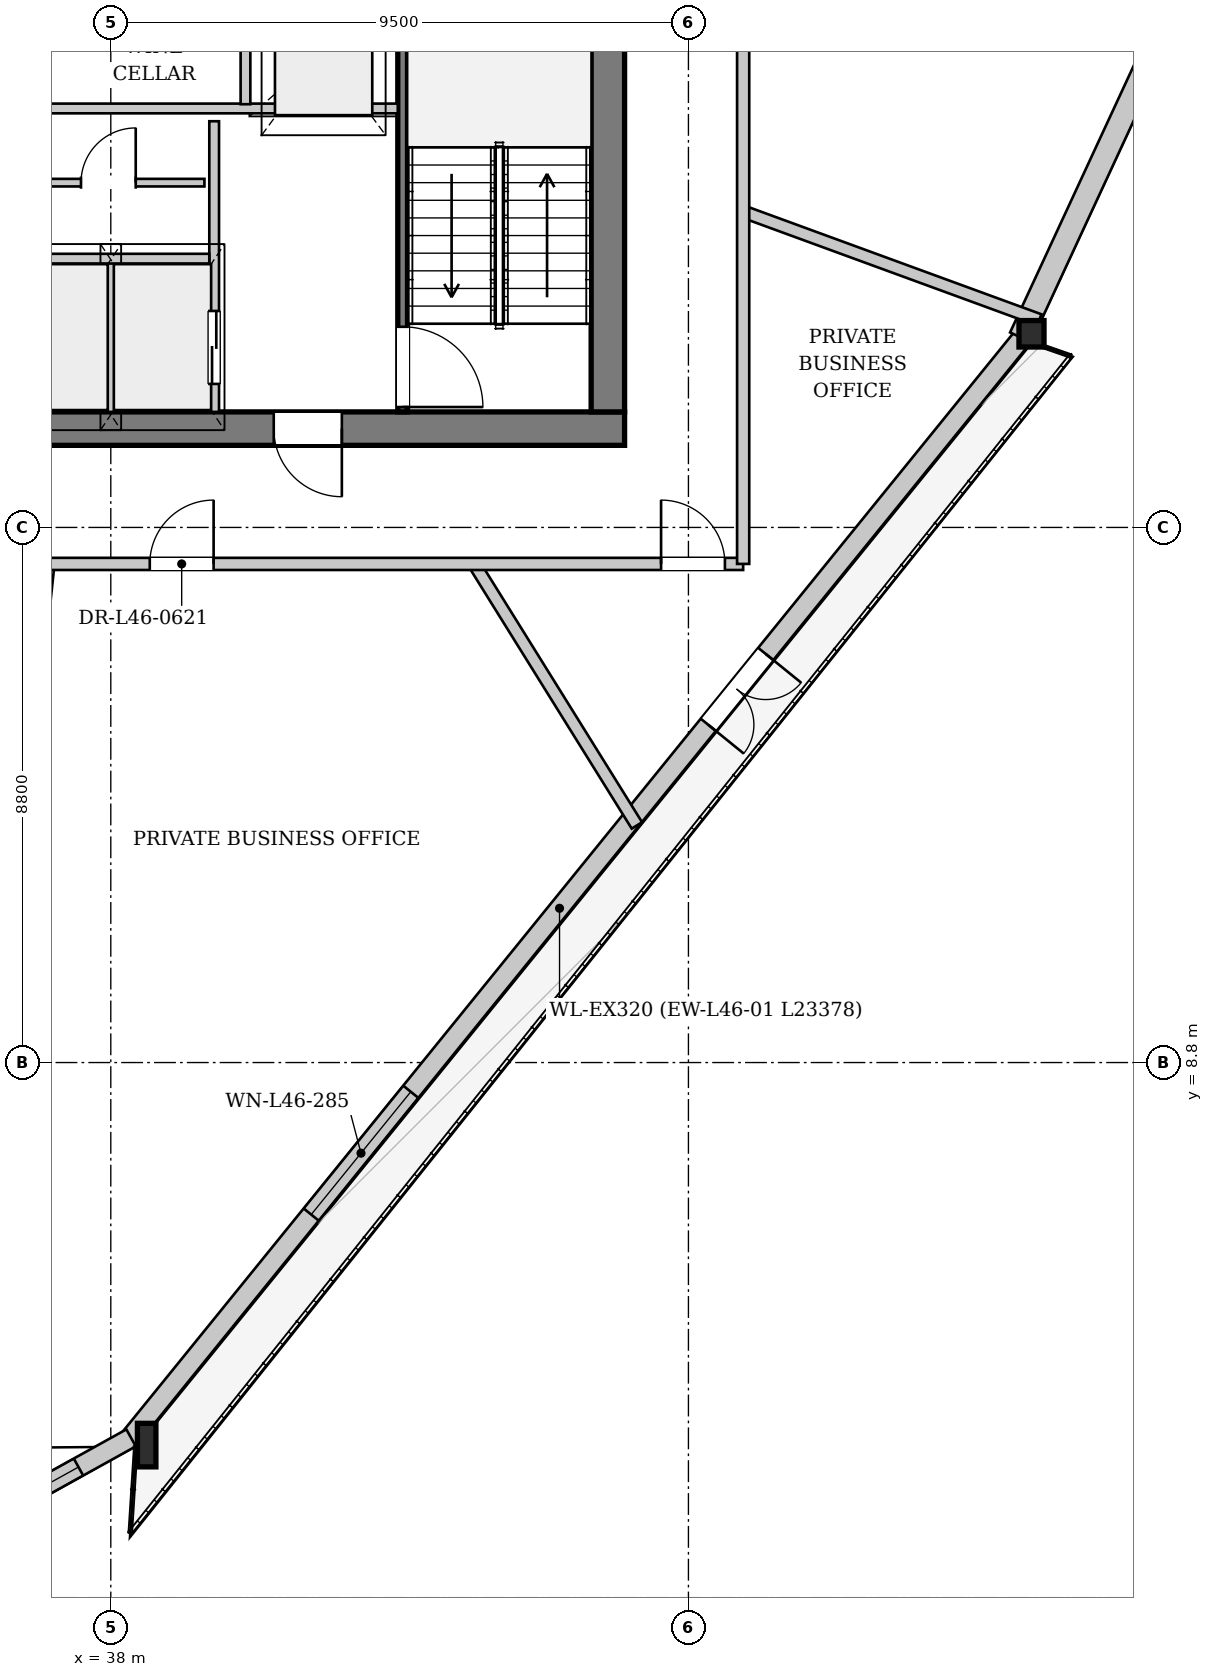
"""IFC4 building model, lengths in metres.
Left out: names, types, materials, properties, quantities, classifications, styles, units other than length and angle.
Written with IfcOpenShell. Run it as: python <this file> out.ifc"""

import sys

from ifc_helpers import new_model, si_unit, direction, frame, frame_2d, origin, origin_2d, place, context, subcontext, project, spatial, rectangle, i_section, extrude, source, transform, mapped, element, fill, save


model = new_model("IFC4")
c1 = context("Model", 3, precision=1e-05, world=origin(), true_north=direction((0.0, 1.0)))
c2 = subcontext(c1, "Body", "Model", "MODEL_VIEW")
j1 = project(units=[si_unit("LENGTHUNIT", "METRE"), si_unit("PLANEANGLEUNIT", "RADIAN")], contexts=[c1])
p1 = place(None, origin())
s1 = spatial("IfcSite", under=j1, at=p1, CompositionType="ELEMENT")
p2 = place(p1, origin())
s2 = spatial("IfcBuilding", under=s1, at=p2, CompositionType="ELEMENT")
p3 = place(p2, frame((0.0, 0.0, 175.0)))
s3 = spatial("IfcBuildingStorey", under=s2, at=p3, CompositionType="ELEMENT", Elevation=175.0)
m1 = source(origin(), c2, "Body", "SweptSolid", [
    extrude(i_section(OverallWidth=0.304, OverallDepth=0.716, WebThickness=0.021, FlangeThickness=0.04, at=origin_2d()), origin(), (0.0, 0.0, 1.0), 3.404),
])
p4 = place(p3, frame((38.411, 2.488, 0.0), z_axis=(0.105068811283, 0.012335723919, 0.994388442617), x_axis=(-0.116605238745, 0.993178341637, 0.0)))
e1 = element("IfcColumn", 1, at=p4, inside=s3, PredefinedType="COLUMN", context=c2, shape_type="MappedRepresentation", body=[
    mapped(m1, transform((0.0, 0.0, 0.0), x_axis=(1.0, 0.0, 0.0), y_axis=(0.0, 1.0, 0.0), z_axis=(0.0, 0.0, 1.0), scale=1.0)),
])
m2 = source(origin(), c2, "Body", "SweptSolid", [
    extrude(i_section(OverallWidth=0.412, OverallDepth=0.435, WebThickness=0.031, FlangeThickness=0.05, at=origin_2d()), origin(), (0.0, 0.0, 1.0), 3.396),
])
p5 = place(p3, frame((53.135, 20.647, 0.0), z_axis=(0.00424121851, 0.081230117231, 0.996686349922), x_axis=(-0.998639713808, 0.052141365588, 0.0)))
e2 = element("IfcColumn", 2, at=p5, inside=s3, PredefinedType="COLUMN", context=c2, shape_type="MappedRepresentation", body=[
    mapped(m2, transform((0.0, 0.0, 0.0), x_axis=(1.0, 0.0, 0.0), y_axis=(0.0, 1.0, 0.0), z_axis=(0.0, 0.0, 1.0), scale=1.0)),
])
p6 = place(p3, frame((53.01, 20.748, 0.0), z_axis=(0.0, 0.0, 1.0), x_axis=(-0.629806386055, -0.776752158725, 0.0)))
e3 = element("IfcWall", 3, at=p6, inside=s3, PredefinedType="SOLIDWALL", context=c2, shape_type="SweptSolid", body=[
    extrude(rectangle(XDim=23.378, YDim=0.32, at=frame_2d((11.689, 0.0))), origin(), (0.0, 0.0, 1.0), 2.722),
])
p7 = place(p6, frame((6.731, 0.0, 0.0)))
e4 = element("IfcOpeningElement", 4, at=p7, cuts=e3, PredefinedType="OPENING", context=c2, shape_type="SweptSolid", body=[
    extrude(rectangle(XDim=1.5, YDim=2.3, at=frame_2d((0.75, 1.15))), frame((0.0, 0.17, 0.0), z_axis=(0.0, -1.0, 0.0), x_axis=(1.0, 0.0, 0.0)), (0.0, 0.0, 1.0), 0.34),
])
p8 = place(p6, frame((16.0, 0.0, 0.252)))
e5 = element("IfcOpeningElement", 5, at=p8, cuts=e3, PredefinedType="OPENING", context=c2, shape_type="SweptSolid", body=[
    extrude(rectangle(XDim=2.6, YDim=2.35, at=frame_2d((1.3, 1.175))), frame((0.0, 0.17, 0.0), z_axis=(0.0, -1.0, 0.0), x_axis=(1.0, 0.0, 0.0)), (0.0, 0.0, 1.0), 0.34),
])
p9 = place(p3, frame((38.333, 2.628, 0.0), z_axis=(0.0, 0.0, 1.0), x_axis=(-0.874431894113, -0.485148289246, 0.0)))
e6 = element("IfcWall", 6, at=p9, inside=s3, PredefinedType="SOLIDWALL", context=c2, shape_type="SweptSolid", body=[
    extrude(rectangle(XDim=3.479, YDim=0.32, at=frame_2d((1.739, 0.0))), origin(), (0.0, 0.0, 1.0), 2.722),
])
p10 = place(p9, frame((0.989, 0.0, 0.302)))
e7 = element("IfcOpeningElement", 7, at=p10, cuts=e6, PredefinedType="OPENING", context=c2, shape_type="SweptSolid", body=[
    extrude(rectangle(XDim=1.5, YDim=2.3, at=frame_2d((0.75, 1.15))), frame((0.0, 0.17, 0.0), z_axis=(0.0, -1.0, 0.0), x_axis=(1.0, 0.0, 0.0)), (0.0, 0.0, 1.0), 0.34),
])
p11 = place(p3, frame((62.792, 41.938, 0.0), z_axis=(0.0, 0.0, 1.0), x_axis=(-0.420482819505, -0.907300500662, 0.0)))
e8 = element("IfcWall", 8, at=p11, inside=s3, PredefinedType="SOLIDWALL", context=c2, shape_type="SweptSolid", body=[
    extrude(rectangle(XDim=23.378, YDim=0.38, at=frame_2d((11.689, 0.0))), origin(), (0.0, 0.0, 1.0), 2.722),
])
p12 = place(p11, frame((5.446, 0.0, 0.352)))
e9 = element("IfcOpeningElement", 9, at=p12, cuts=e8, PredefinedType="OPENING", context=c2, shape_type="SweptSolid", body=[
    extrude(rectangle(XDim=2.2, YDim=2.25, at=frame_2d((1.1, 1.125))), frame((0.0, 0.2, 0.0), z_axis=(0.0, -1.0, 0.0), x_axis=(1.0, 0.0, 0.0)), (0.0, 0.0, 1.0), 0.4),
])
p13 = place(p11, frame((15.732, 0.0, 0.352)))
e10 = element("IfcOpeningElement", 10, at=p13, cuts=e8, PredefinedType="OPENING", context=c2, shape_type="SweptSolid", body=[
    extrude(rectangle(XDim=2.2, YDim=2.25, at=frame_2d((1.1, 1.125))), frame((0.0, 0.2, 0.0), z_axis=(0.0, -1.0, 0.0), x_axis=(1.0, 0.0, 0.0)), (0.0, 0.0, 1.0), 0.4),
])
p14 = place(p3, frame((46.45, 19.225, 0.0), z_axis=(0.0, 0.0, 1.0), x_axis=(-1.0, 0.0, 0.0)))
e11 = element("IfcWall", 11, at=p14, inside=s3, PredefinedType="SHEAR", context=c2, shape_type="SweptSolid", body=[
    extrude(rectangle(XDim=16.9, YDim=0.55, at=frame_2d((8.45, 0.0))), origin(), (0.0, 0.0, 1.0), 3.33),
])
p15 = place(p14, frame((4.65, 0.0, 0.0)))
e12 = element("IfcOpeningElement", 12, at=p15, cuts=e11, PredefinedType="OPENING", context=c2, shape_type="SweptSolid", body=[
    extrude(rectangle(XDim=1.12, YDim=2.25, at=frame_2d((0.56, 1.125))), frame((0.0, 0.285, 0.0), z_axis=(0.0, -1.0, 0.0), x_axis=(1.0, 0.0, 0.0)), (0.0, 0.0, 1.0), 0.57),
])
p16 = place(p14, frame((11.15, 0.0, 0.0)))
e13 = element("IfcOpeningElement", 13, at=p16, cuts=e11, PredefinedType="OPENING", context=c2, shape_type="SweptSolid", body=[
    extrude(rectangle(XDim=1.12, YDim=2.25, at=frame_2d((0.56, 1.125))), frame((0.0, 0.285, 0.0), z_axis=(0.0, -1.0, 0.0), x_axis=(1.0, 0.0, 0.0)), (0.0, 0.0, 1.0), 0.57),
])
p17 = place(p3, frame((46.175, 33.7, 0.0), z_axis=(0.0, 0.0, 1.0), x_axis=(0.0, -1.0, 0.0)))
e14 = element("IfcWall", 14, at=p17, inside=s3, PredefinedType="SHEAR", context=c2, shape_type="SweptSolid", body=[
    extrude(rectangle(XDim=14.2, YDim=0.55, at=frame_2d((7.1, 0.0))), origin(), (0.0, 0.0, 1.0), 3.33),
])
p18 = place(p17, frame((5.18, 0.0, 0.0)))
e15 = element("IfcOpeningElement", 15, at=p18, cuts=e14, PredefinedType="OPENING", context=c2, shape_type="SweptSolid", body=[
    extrude(rectangle(XDim=1.6, YDim=2.2, at=frame_2d((0.8, 1.1))), frame((0.0, 0.285, 0.0), z_axis=(0.0, -1.0, 0.0), x_axis=(1.0, 0.0, 0.0)), (0.0, 0.0, 1.0), 0.57),
])
p19 = place(p17, frame((2.05, 0.0, 0.0)))
e16 = element("IfcOpeningElement", 16, at=p19, cuts=e14, PredefinedType="OPENING", context=c2, shape_type="SweptSolid", body=[
    extrude(rectangle(XDim=0.95, YDim=2.1, at=frame_2d((0.475, 1.05))), frame((0.0, 0.285, 0.0), z_axis=(0.0, -1.0, 0.0), x_axis=(1.0, 0.0, 0.0)), (0.0, 0.0, 1.0), 0.57),
])
p20 = place(p3, frame((42.8, 26.96, 0.0), z_axis=(0.0, 0.0, 1.0), x_axis=(0.0, -1.0, 0.0)))
e17 = element("IfcWall", 17, at=p20, inside=s3, PredefinedType="PARTITIONING", context=c2, shape_type="SweptSolid", body=[
    extrude(rectangle(XDim=7.46, YDim=0.16, at=frame_2d((3.73, 0.0))), origin(), (0.0, 0.0, 1.0), 3.33),
])
p21 = place(p20, frame((6.06, 0.0, 0.0)))
e18 = element("IfcOpeningElement", 18, at=p21, cuts=e17, PredefinedType="OPENING", context=c2, shape_type="SweptSolid", body=[
    extrude(rectangle(XDim=1.32, YDim=2.2, at=frame_2d((0.66, 1.1))), frame((0.0, 0.09, 0.0), z_axis=(0.0, -1.0, 0.0), x_axis=(1.0, 0.0, 0.0)), (0.0, 0.0, 1.0), 0.18),
])
p22 = place(p3, frame((39.7, 24.28, 0.0), z_axis=(0.0, 0.0, 1.0), x_axis=(0.0, -1.0, 0.0)))
e19 = element("IfcWall", 19, at=p22, inside=s3, PredefinedType="PARTITIONING", context=c2, shape_type="SweptSolid", body=[
    extrude(rectangle(XDim=4.78, YDim=0.16, at=frame_2d((2.39, 0.0))), origin(), (0.0, 0.0, 1.0), 3.33),
])
p23 = place(p22, frame((3.12, 0.0, 0.0)))
e20 = element("IfcOpeningElement", 20, at=p23, cuts=e19, PredefinedType="OPENING", context=c2, shape_type="SweptSolid", body=[
    extrude(rectangle(XDim=1.2, YDim=2.2, at=frame_2d((0.6, 1.1))), frame((0.0, 0.09, 0.0), z_axis=(0.0, -1.0, 0.0), x_axis=(1.0, 0.0, 0.0)), (0.0, 0.0, 1.0), 0.18),
])
p24 = place(p3, frame((38.0, 19.5, 0.0), z_axis=(0.0, 0.0, 1.0), x_axis=(0.0, 1.0, 0.0)))
e21 = element("IfcWall", 21, at=p24, inside=s3, PredefinedType="PARTITIONING", context=c2, shape_type="SweptSolid", body=[
    extrude(rectangle(XDim=2.46, YDim=0.125, at=frame_2d((1.23, 0.0))), origin(), (0.0, 0.0, 1.0), 3.33),
])
p25 = place(p3, frame((36.38, 22.02, 0.0), z_axis=(0.0, 0.0, 1.0), x_axis=(1.0, 0.0, 0.0)))
e22 = element("IfcWall", 22, at=p25, inside=s3, PredefinedType="PARTITIONING", context=c2, shape_type="SweptSolid", body=[
    extrude(rectangle(XDim=3.24, YDim=0.16, at=frame_2d((1.62, 0.0))), origin(), (0.0, 0.0, 1.0), 3.33),
])
p26 = place(p3, frame((33.28, 24.49, 0.0), z_axis=(0.0, 0.0, 1.0), x_axis=(1.0, 0.0, 0.0)))
e23 = element("IfcWall", 23, at=p26, inside=s3, PredefinedType="PARTITIONING", context=c2, shape_type="SweptSolid", body=[
    extrude(rectangle(XDim=9.44, YDim=0.16, at=frame_2d((4.72, 0.0))), origin(), (0.0, 0.0, 1.0), 3.33),
])
p27 = place(p3, frame((36.46, 23.27, 0.0), z_axis=(0.0, 0.0, 1.0), x_axis=(1.0, 0.0, 0.0)))
e24 = element("IfcWall", 24, at=p27, inside=s3, PredefinedType="PARTITIONING", context=c2, shape_type="SweptSolid", body=[
    extrude(rectangle(XDim=3.08, YDim=0.125, at=frame_2d((1.54, 0.0))), origin(), (0.0, 0.0, 1.0), 3.33),
])
p28 = place(p27, frame((1.05, 0.0, 0.0)))
e25 = element("IfcOpeningElement", 25, at=p28, cuts=e24, PredefinedType="OPENING", context=c2, shape_type="SweptSolid", body=[
    extrude(rectangle(XDim=0.9, YDim=2.1, at=frame_2d((0.45, 1.05))), frame((0.0, 0.073, 0.0), z_axis=(0.0, -1.0, 0.0), x_axis=(1.0, 0.0, 0.0)), (0.0, 0.0, 1.0), 0.145),
])
p29 = place(p3, frame((40.215, 24.56, 0.0), z_axis=(0.0, 0.0, 1.0), x_axis=(0.0, 1.0, 0.0)))
e26 = element("IfcWall", 26, at=p29, inside=s3, PredefinedType="PARTITIONING", context=c2, shape_type="SweptSolid", body=[
    extrude(rectangle(XDim=2.31, YDim=0.16, at=frame_2d((1.155, 0.0))), origin(), (0.0, 0.0, 1.0), 3.33),
])
p30 = place(p3, frame((36.974, 17.0, 0.0), z_axis=(0.0, 0.0, 1.0), x_axis=(-0.106274717856, -0.994336806291, 0.0)))
e27 = element("IfcWall", 27, at=p30, inside=s3, PredefinedType="PARTITIONING", context=c2, shape_type="SweptSolid", body=[
    extrude(rectangle(XDim=16.113, YDim=0.2, at=frame_2d((8.057, 0.0))), origin(), (0.0, 0.0, 1.0), 3.33),
])
p31 = place(p3, frame((43.976, 17.0, 0.0), z_axis=(0.0, 0.0, 1.0), x_axis=(0.528425417739, -0.848979727607, 0.0)))
e28 = element("IfcWall", 28, at=p31, inside=s3, PredefinedType="PARTITIONING", context=c2, shape_type="SweptSolid", body=[
    extrude(rectangle(XDim=5.065, YDim=0.2, at=frame_2d((2.533, 0.0))), origin(), (0.0, 0.0, 1.0), 3.33),
])
p32 = place(p3, frame((48.4, 22.794, 0.0), z_axis=(0.0, 0.0, 1.0), x_axis=(0.939100254498, -0.343643291805, 0.0)))
e29 = element("IfcWall", 29, at=p32, inside=s3, PredefinedType="PARTITIONING", context=c2, shape_type="SweptSolid", body=[
    extrude(rectangle(XDim=5.187, YDim=0.2, at=frame_2d((2.594, 0.0))), origin(), (0.0, 0.0, 1.0), 2.865),
])
p33 = place(p3, frame((27.6, 17.0, 0.0), z_axis=(0.0, 0.0, 1.0), x_axis=(1.0, 0.0, 0.0)))
e30 = element("IfcWall", 30, at=p33, inside=s3, PredefinedType="PARTITIONING", context=c2, shape_type="SweptSolid", body=[
    extrude(rectangle(XDim=20.8, YDim=0.2, at=frame_2d((10.4, 0.0))), origin(), (0.0, 0.0, 1.0), 3.33),
])
p34 = place(p33, frame((4.656, 0.0, 0.0)))
e31 = element("IfcOpeningElement", 31, at=p34, cuts=e30, PredefinedType="OPENING", context=c2, shape_type="SweptSolid", body=[
    extrude(rectangle(XDim=1.05, YDim=2.2, at=frame_2d((0.525, 1.1))), frame((0.0, 0.11, 0.0), z_axis=(0.0, -1.0, 0.0), x_axis=(1.0, 0.0, 0.0)), (0.0, 0.0, 1.0), 0.22),
])
p35 = place(p33, frame((11.041, 0.0, 0.0)))
e32 = element("IfcOpeningElement", 32, at=p35, cuts=e30, PredefinedType="OPENING", context=c2, shape_type="SweptSolid", body=[
    extrude(rectangle(XDim=1.05, YDim=2.2, at=frame_2d((0.525, 1.1))), frame((0.0, 0.11, 0.0), z_axis=(0.0, -1.0, 0.0), x_axis=(1.0, 0.0, 0.0)), (0.0, 0.0, 1.0), 0.22),
])
p36 = place(p33, frame((19.45, 0.0, 0.0)))
e33 = element("IfcOpeningElement", 33, at=p36, cuts=e30, PredefinedType="OPENING", context=c2, shape_type="SweptSolid", body=[
    extrude(rectangle(XDim=1.05, YDim=2.2, at=frame_2d((0.525, 1.1))), frame((0.0, 0.11, 0.0), z_axis=(0.0, -1.0, 0.0), x_axis=(1.0, 0.0, 0.0)), (0.0, 0.0, 1.0), 0.22),
])
p37 = place(p3, frame((48.4, 17.0, 0.0), z_axis=(0.0, 0.0, 1.0), x_axis=(0.0, 1.0, 0.0)))
e34 = element("IfcWall", 34, at=p37, inside=s3, PredefinedType="PARTITIONING", context=c2, shape_type="SweptSolid", body=[
    extrude(rectangle(XDim=19.2, YDim=0.2, at=frame_2d((9.6, 0.0))), origin(), (0.0, 0.0, 1.0), 3.33),
])
p38 = place(p37, frame((8.849, 0.0, 0.0)))
e35 = element("IfcOpeningElement", 35, at=p38, cuts=e34, PredefinedType="OPENING", context=c2, shape_type="SweptSolid", body=[
    extrude(rectangle(XDim=1.05, YDim=2.2, at=frame_2d((0.525, 1.1))), frame((0.0, 0.11, 0.0), z_axis=(0.0, -1.0, 0.0), x_axis=(1.0, 0.0, 0.0)), (0.0, 0.0, 1.0), 0.22),
])
m3 = source(origin(), c2, "Body", "SweptSolid", [
    extrude(rectangle(XDim=1.5, YDim=2.3, at=frame_2d((0.75, 1.15))), frame((0.0, 0.025, 0.0), z_axis=(0.0, -1.0, 0.0), x_axis=(1.0, 0.0, 0.0)), (0.0, 0.0, 1.0), 0.05),
])
p39 = place(p7, origin())
e36 = element("IfcDoor", 36, at=p39, inside=s3, OperationType="DOUBLE_DOOR_SINGLE_SWING", PredefinedType="DOOR", context=c2, shape_type="MappedRepresentation", body=[
    mapped(m3, transform((0.0, 0.0, 0.0), x_axis=(1.0, 0.0, 0.0), y_axis=(0.0, 1.0, 0.0), z_axis=(0.0, 0.0, 1.0), scale=1.0)),
])
fill(e4, e36)
m4 = source(origin(), c2, "Body", "SweptSolid", [
    extrude(rectangle(XDim=2.6, YDim=2.35, at=frame_2d((1.3, 1.175))), frame((0.0, 0.03, 0.0), z_axis=(0.0, -1.0, 0.0), x_axis=(1.0, 0.0, 0.0)), (0.0, 0.0, 1.0), 0.06),
])
p40 = place(p8, origin())
e37 = element("IfcWindow", 37, at=p40, inside=s3, PartitioningType="SINGLE_PANEL", PredefinedType="WINDOW", context=c2, shape_type="MappedRepresentation", body=[
    mapped(m4, transform((0.0, 0.0, 0.0), x_axis=(1.0, 0.0, 0.0), y_axis=(0.0, 1.0, 0.0), z_axis=(0.0, 0.0, 1.0), scale=1.0)),
])
fill(e5, e37)
m5 = source(origin(), c2, "Body", "SweptSolid", [
    extrude(rectangle(XDim=1.5, YDim=2.3, at=frame_2d((0.75, 1.15))), frame((0.0, 0.03, 0.0), z_axis=(0.0, -1.0, 0.0), x_axis=(1.0, 0.0, 0.0)), (0.0, 0.0, 1.0), 0.06),
])
p41 = place(p10, origin())
e38 = element("IfcWindow", 38, at=p41, inside=s3, PartitioningType="SINGLE_PANEL", PredefinedType="WINDOW", context=c2, shape_type="MappedRepresentation", body=[
    mapped(m5, transform((0.0, 0.0, 0.0), x_axis=(1.0, 0.0, 0.0), y_axis=(0.0, 1.0, 0.0), z_axis=(0.0, 0.0, 1.0), scale=1.0)),
])
fill(e7, e38)
m6 = source(origin(), c2, "Body", "SweptSolid", [
    extrude(rectangle(XDim=1.12, YDim=2.25, at=frame_2d((0.56, 1.125))), frame((0.0, 0.025, 0.0), z_axis=(0.0, -1.0, 0.0), x_axis=(1.0, 0.0, 0.0)), (0.0, 0.0, 1.0), 0.05),
])
p42 = place(p15, origin())
e39 = element("IfcDoor", 39, at=p42, inside=s3, OperationType="SINGLE_SWING_LEFT", PredefinedType="DOOR", context=c2, shape_type="MappedRepresentation", body=[
    mapped(m6, transform((0.0, 0.0, 0.0), x_axis=(1.0, 0.0, 0.0), y_axis=(0.0, 1.0, 0.0), z_axis=(0.0, 0.0, 1.0), scale=1.0)),
])
fill(e12, e39)
m7 = source(origin(), c2, "Body", "SweptSolid", [
    extrude(rectangle(XDim=1.32, YDim=2.2, at=frame_2d((0.66, 1.1))), frame((0.0, 0.025, 0.0), z_axis=(0.0, -1.0, 0.0), x_axis=(1.0, 0.0, 0.0)), (0.0, 0.0, 1.0), 0.05),
])
p43 = place(p21, origin())
e40 = element("IfcDoor", 40, at=p43, inside=s3, OperationType="SINGLE_SWING_RIGHT", PredefinedType="DOOR", context=c2, shape_type="MappedRepresentation", body=[
    mapped(m7, transform((0.0, 0.0, 0.0), x_axis=(1.0, 0.0, 0.0), y_axis=(0.0, 1.0, 0.0), z_axis=(0.0, 0.0, 1.0), scale=1.0)),
])
fill(e18, e40)
m8 = source(origin(), c2, "Body", "SweptSolid", [
    extrude(rectangle(XDim=0.9, YDim=2.1, at=frame_2d((0.45, 1.05))), frame((0.0, 0.025, 0.0), z_axis=(0.0, -1.0, 0.0), x_axis=(1.0, 0.0, 0.0)), (0.0, 0.0, 1.0), 0.05),
])
p44 = place(p28, origin())
e41 = element("IfcDoor", 41, at=p44, inside=s3, OperationType="SINGLE_SWING_RIGHT", PredefinedType="DOOR", context=c2, shape_type="MappedRepresentation", body=[
    mapped(m8, transform((0.0, 0.0, 0.0), x_axis=(1.0, 0.0, 0.0), y_axis=(0.0, 1.0, 0.0), z_axis=(0.0, 0.0, 1.0), scale=1.0)),
])
fill(e25, e41)
m9 = source(origin(), c2, "Body", "SweptSolid", [
    extrude(rectangle(XDim=1.2, YDim=2.2, at=frame_2d((0.6, 1.1))), frame((0.0, 0.025, 0.0), z_axis=(0.0, -1.0, 0.0), x_axis=(1.0, 0.0, 0.0)), (0.0, 0.0, 1.0), 0.05),
])
p45 = place(p23, origin())
e42 = element("IfcDoor", 42, at=p45, inside=s3, OperationType="DOUBLE_DOOR_SLIDING", PredefinedType="DOOR", context=c2, shape_type="MappedRepresentation", body=[
    mapped(m9, transform((0.0, 0.0, 0.0), x_axis=(1.0, 0.0, 0.0), y_axis=(0.0, 1.0, 0.0), z_axis=(0.0, 0.0, 1.0), scale=1.0)),
])
fill(e20, e42)
m10 = source(origin(), c2, "Body", "SweptSolid", [
    extrude(rectangle(XDim=1.05, YDim=2.2, at=frame_2d((0.525, 1.1))), frame((0.0, 0.025, 0.0), z_axis=(0.0, -1.0, 0.0), x_axis=(1.0, 0.0, 0.0)), (0.0, 0.0, 1.0), 0.05),
])
p46 = place(p35, origin())
e43 = element("IfcDoor", 43, at=p46, inside=s3, OperationType="SINGLE_SWING_RIGHT", PredefinedType="DOOR", context=c2, shape_type="MappedRepresentation", body=[
    mapped(m10, transform((0.0, 0.0, 0.0), x_axis=(1.0, 0.0, 0.0), y_axis=(0.0, 1.0, 0.0), z_axis=(0.0, 0.0, 1.0), scale=1.0)),
])
fill(e32, e43)
p47 = place(p36, origin())
e44 = element("IfcDoor", 44, at=p47, inside=s3, OperationType="SINGLE_SWING_LEFT", PredefinedType="DOOR", context=c2, shape_type="MappedRepresentation", body=[
    mapped(m10, transform((0.0, 0.0, 0.0), x_axis=(1.0, 0.0, 0.0), y_axis=(0.0, 1.0, 0.0), z_axis=(0.0, 0.0, 1.0), scale=1.0)),
])
fill(e33, e44)
save(model, sys.argv[1])
